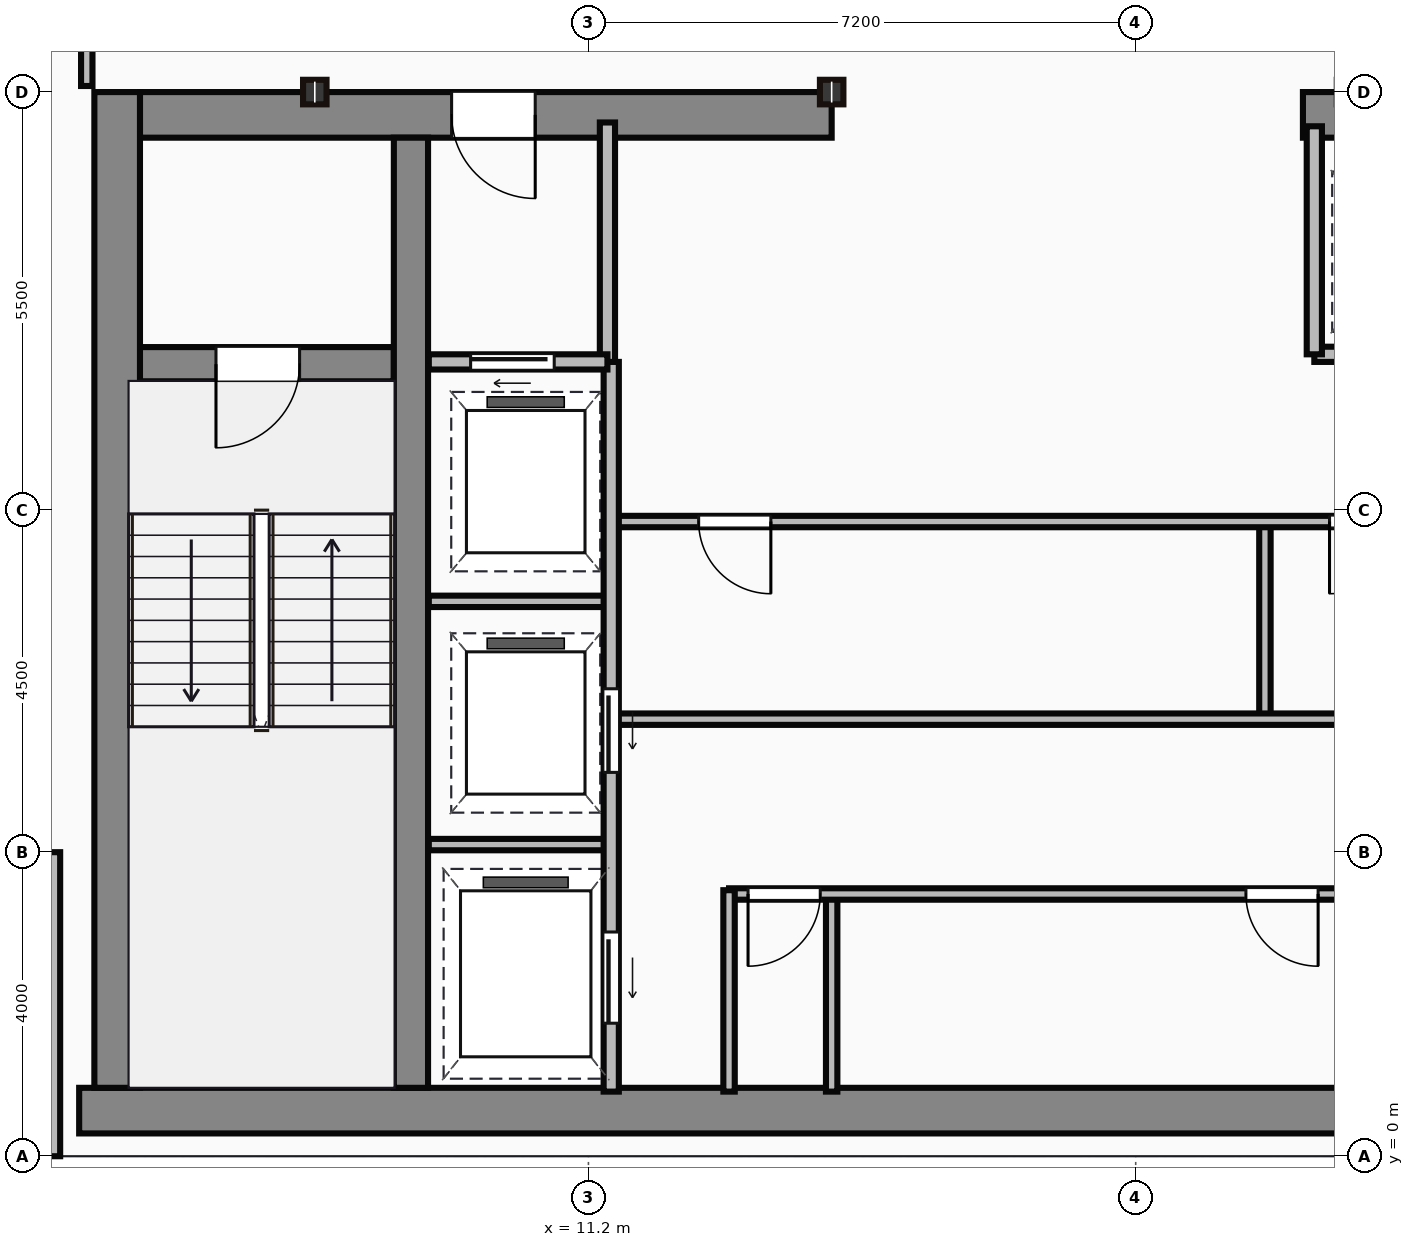
"""IFC4 building model, lengths in metres.
Left out: names, types, materials, properties, quantities, classifications, styles, units other than length and angle.
Written with IfcOpenShell. Run it as: python <this file> out.ifc"""

import sys

from ifc_helpers import new_model, si_unit, direction, frame, frame_2d, origin, origin_2d, place, context, subcontext, project, spatial, rectangle, i_section, extrude, source, transform, mapped, element, fill, save


model = new_model("IFC4")
c1 = context("Model", 3, precision=1e-05, world=origin(), true_north=direction((0.0, 1.0)))
c2 = subcontext(c1, "Body", "Model", "MODEL_VIEW")
j1 = project(units=[si_unit("LENGTHUNIT", "METRE"), si_unit("PLANEANGLEUNIT", "RADIAN")], contexts=[c1])
p1 = place(None, origin())
s1 = spatial("IfcSite", under=j1, at=p1, CompositionType="ELEMENT")
p2 = place(p1, origin())
s2 = spatial("IfcBuilding", under=s1, at=p2, CompositionType="ELEMENT")
p3 = place(p2, frame((0.0, 0.0, 225.1)))
s3 = spatial("IfcBuildingStorey", under=s2, at=p3, CompositionType="ELEMENT", Elevation=225.1)
m1 = source(origin(), c2, "Body", "SweptSolid", [
    extrude(rectangle(XDim=29.5, YDim=0.6, at=frame_2d((14.75, 0.0))), origin(), (0.0, 0.0, 1.0), 3.65),
])
p4 = place(p3, frame((4.5, 0.6, 0.0), z_axis=(0.0, 0.0, 1.0), x_axis=(1.0, 0.0, 0.0)))
e1 = element("IfcWall", 1, at=p4, inside=s3, PredefinedType="SHEAR", context=c2, shape_type="MappedRepresentation", body=[
    mapped(m1, transform((0.0, 0.0, 0.0))),
])
m2 = source(origin(), c2, "Body", "SweptSolid", [
    extrude(rectangle(XDim=13.1, YDim=0.6, at=frame_2d((6.55, 0.0))), origin(), (0.0, 0.0, 1.0), 3.65),
])
p5 = place(p3, frame((5.0, 0.9, 0.0), z_axis=(0.0, 0.0, 1.0), x_axis=(0.0, 1.0, 0.0)))
e2 = element("IfcWall", 2, at=p5, inside=s3, PredefinedType="SHEAR", context=c2, shape_type="MappedRepresentation", body=[
    mapped(m2, transform((0.0, 0.0, 0.0))),
])
m3 = source(origin(), c2, "Body", "SweptSolid", [
    extrude(rectangle(XDim=9.1, YDim=0.6, at=frame_2d((4.55, 0.0))), origin(), (0.0, 0.0, 1.0), 3.65),
])
p6 = place(p3, frame((5.3, 13.7, 0.0), z_axis=(0.0, 0.0, 1.0), x_axis=(1.0, 0.0, 0.0)))
e3 = element("IfcWall", 3, at=p6, inside=s3, PredefinedType="SHEAR", context=c2, shape_type="MappedRepresentation", body=[
    mapped(m3, transform((0.0, 0.0, 0.0))),
])
p7 = place(p6, frame((4.1, 0.0, 0.0)))
e4 = element("IfcOpeningElement", 4, at=p7, cuts=e3, PredefinedType="OPENING", context=c2, shape_type="SweptSolid", body=[
    extrude(rectangle(XDim=1.1, YDim=2.15, at=frame_2d((0.55, 1.075))), frame((0.0, 0.31, 0.0), z_axis=(0.0, -1.0, 0.0), x_axis=(1.0, 0.0, 0.0)), (0.0, 0.0, 1.0), 0.62),
])
m4 = source(origin(), c2, "Body", "SweptSolid", [
    extrude(rectangle(XDim=12.6, YDim=0.6, at=frame_2d((6.3, 0.0))), origin(), (0.0, 0.0, 1.0), 3.65),
])
p8 = place(p3, frame((20.6, 13.7, 0.0), z_axis=(0.0, 0.0, 1.0), x_axis=(1.0, 0.0, 0.0)))
e5 = element("IfcWall", 5, at=p8, inside=s3, PredefinedType="SHEAR", context=c2, shape_type="MappedRepresentation", body=[
    mapped(m4, transform((0.0, 0.0, 0.0))),
])
p9 = place(p8, frame((9.25, 0.0, 0.0)))
e6 = element("IfcOpeningElement", 6, at=p9, cuts=e5, PredefinedType="OPENING", context=c2, shape_type="SweptSolid", body=[
    extrude(rectangle(XDim=1.1, YDim=2.15, at=frame_2d((0.55, 1.075))), frame((0.0, 0.31, 0.0), z_axis=(0.0, -1.0, 0.0), x_axis=(1.0, 0.0, 0.0)), (0.0, 0.0, 1.0), 0.62),
])
m5 = source(origin(), c2, "Body", "SweptSolid", [
    extrude(rectangle(XDim=12.5, YDim=0.45, at=frame_2d((6.25, 0.0))), origin(), (0.0, 0.0, 1.0), 3.65),
])
p10 = place(p3, frame((8.865, 0.9, 0.0), z_axis=(0.0, 0.0, 1.0), x_axis=(0.0, 1.0, 0.0)))
e7 = element("IfcWall", 7, at=p10, inside=s3, PredefinedType="SHEAR", context=c2, shape_type="MappedRepresentation", body=[
    mapped(m5, transform((0.0, 0.0, 0.0))),
])
m6 = source(origin(), c2, "Body", "SweptSolid", [
    extrude(rectangle(XDim=3.39, YDim=0.45, at=frame_2d((1.695, 0.0))), origin(), (0.0, 0.0, 1.0), 3.65),
])
p11 = place(p3, frame((5.25, 10.42, 0.0), z_axis=(0.0, 0.0, 1.0), x_axis=(1.0, 0.0, 0.0)))
e8 = element("IfcWall", 8, at=p11, inside=s3, PredefinedType="SHEAR", context=c2, shape_type="MappedRepresentation", body=[
    mapped(m6, transform((0.0, 0.0, 0.0))),
])
p12 = place(p11, frame((1.05, 0.0, 0.0)))
e9 = element("IfcOpeningElement", 9, at=p12, cuts=e8, PredefinedType="OPENING", context=c2, shape_type="SweptSolid", body=[
    extrude(rectangle(XDim=1.1, YDim=2.15, at=frame_2d((0.55, 1.075))), frame((0.0, 0.235, 0.0), z_axis=(0.0, -1.0, 0.0), x_axis=(1.0, 0.0, 0.0)), (0.0, 0.0, 1.0), 0.47),
])
m7 = source(origin(), c2, "Body", "SweptSolid", [
    extrude(i_section(OverallWidth=0.309, OverallDepth=0.323, WebThickness=0.014, FlangeThickness=0.023, at=origin_2d()), origin(), (0.0, 0.0, 1.0), 3.65),
])
for number, where, z_axis, x_axis in (
    (10, (7.6, 14.0, 0.0), (0.0, 0.0, 1.0), (1.0, 0.0, 0.0)),
    (11, (14.4, 14.0, 0.0), (0.0, 0.0, 1.0), (1.0, 0.0, 0.0)),
):
    element("IfcColumn", number, at=place(p3, frame(where, z_axis=z_axis, x_axis=x_axis)), inside=s3, PredefinedType="COLUMN", context=c2, shape_type="MappedRepresentation", body=[
        mapped(m7, transform((0.0, 0.0, 0.0))),
    ])
m8 = source(origin(), c2, "Body", "SweptSolid", [
    extrude(rectangle(XDim=4.0, YDim=0.25, at=frame_2d((2.0, 0.0))), origin(), (0.0, 0.0, 1.0), 3.4),
])
p13 = place(p3, frame((4.125, 4.0, 0.0), z_axis=(0.0, 0.0, 1.0), x_axis=(0.0, -1.0, 0.0)))
e12 = element("IfcWall", 12, at=p13, inside=s3, PredefinedType="STANDARD", context=c2, shape_type="MappedRepresentation", body=[
    mapped(m8, transform((0.0, 0.0, 0.0))),
])
m9 = source(origin(), c2, "Body", "SweptSolid", [
    extrude(rectangle(XDim=3.18, YDim=0.2, at=frame_2d((1.59, 0.0))), origin(), (0.0, 0.0, 1.0), 3.4),
])
p14 = place(p3, frame((11.45, 10.42, 0.0), z_axis=(0.0, 0.0, 1.0), x_axis=(0.0, 1.0, 0.0)))
e13 = element("IfcWall", 13, at=p14, inside=s3, PredefinedType="PARTITIONING", context=c2, shape_type="MappedRepresentation", body=[
    mapped(m9, transform((0.0, 0.0, 0.0))),
])
m10 = source(origin(), c2, "Body", "SweptSolid", [
    extrude(rectangle(XDim=2.35, YDim=0.2, at=frame_2d((1.175, 0.0))), origin(), (0.0, 0.0, 1.0), 3.4),
])
p15 = place(p3, frame((9.1, 10.45, 0.0), z_axis=(0.0, 0.0, 1.0), x_axis=(1.0, 0.0, 0.0)))
e14 = element("IfcWall", 14, at=p15, inside=s3, PredefinedType="PARTITIONING", context=c2, shape_type="MappedRepresentation", body=[
    mapped(m10, transform((0.0, 0.0, 0.0))),
])
p16 = place(p15, frame((0.55, 0.0, 0.0)))
e15 = element("IfcOpeningElement", 15, at=p16, cuts=e14, PredefinedType="OPENING", context=c2, shape_type="SweptSolid", body=[
    extrude(rectangle(XDim=1.1, YDim=2.15, at=frame_2d((0.55, 1.075))), frame((0.0, 0.11, 0.0), z_axis=(0.0, -1.0, 0.0), x_axis=(1.0, 0.0, 0.0)), (0.0, 0.0, 1.0), 0.22),
])
m11 = source(origin(), c2, "Body", "SweptSolid", [
    extrude(rectangle(XDim=9.6, YDim=0.2, at=frame_2d((4.8, 0.0))), origin(), (0.0, 0.0, 1.0), 3.4),
])
p17 = place(p3, frame((11.5, 0.85, 0.0), z_axis=(0.0, 0.0, 1.0), x_axis=(0.0, 1.0, 0.0)))
e16 = element("IfcWall", 16, at=p17, inside=s3, PredefinedType="PARTITIONING", context=c2, shape_type="MappedRepresentation", body=[
    mapped(m11, transform((0.0, 0.0, 0.0))),
])
p18 = place(p17, frame((4.2, 0.0, 0.0)))
e17 = element("IfcOpeningElement", 17, at=p18, cuts=e16, PredefinedType="OPENING", context=c2, shape_type="SweptSolid", body=[
    extrude(rectangle(XDim=1.1, YDim=2.15, at=frame_2d((0.55, 1.075))), frame((0.0, 0.11, 0.0), z_axis=(0.0, -1.0, 0.0), x_axis=(1.0, 0.0, 0.0)), (0.0, 0.0, 1.0), 0.22),
])
p19 = place(p17, frame((0.9, 0.0, 0.0)))
e18 = element("IfcOpeningElement", 18, at=p19, cuts=e16, PredefinedType="OPENING", context=c2, shape_type="SweptSolid", body=[
    extrude(rectangle(XDim=1.2, YDim=2.15, at=frame_2d((0.6, 1.075))), frame((0.0, 0.11, 0.0), z_axis=(0.0, -1.0, 0.0), x_axis=(1.0, 0.0, 0.0)), (0.0, 0.0, 1.0), 0.22),
])
m12 = source(origin(), c2, "Body", "SweptSolid", [
    extrude(rectangle(XDim=2.4, YDim=0.15, at=frame_2d((1.2, 0.0))), origin(), (0.0, 0.0, 1.0), 3.4),
])
for number, where, z_axis, x_axis in (
    (19, (9.1, 4.1, 0.0), (0.0, 0.0, 1.0), (1.0, 0.0, 0.0)),
    (20, (9.1, 7.3, 0.0), (0.0, 0.0, 1.0), (1.0, 0.0, 0.0)),
):
    element("IfcWall", number, at=place(p3, frame(where, z_axis=z_axis, x_axis=x_axis)), inside=s3, PredefinedType="PARTITIONING", context=c2, shape_type="MappedRepresentation", body=[
        mapped(m12, transform((0.0, 0.0, 0.0))),
    ])
m13 = source(origin(), c2, "Body", "SweptSolid", [
    extrude(rectangle(XDim=2.65, YDim=0.15, at=frame_2d((1.325, 0.0))), origin(), (0.0, 0.0, 1.0), 3.4),
])
p20 = place(p3, frame((13.05, 0.85, 0.0), z_axis=(0.0, 0.0, 1.0), x_axis=(0.0, 1.0, 0.0)))
e21 = element("IfcWall", 21, at=p20, inside=s3, PredefinedType="PARTITIONING", context=c2, shape_type="MappedRepresentation", body=[
    mapped(m13, transform((0.0, 0.0, 0.0))),
])
m14 = source(origin(), c2, "Body", "SweptSolid", [
    extrude(rectangle(XDim=10.35, YDim=0.15, at=frame_2d((5.175, 0.0))), origin(), (0.0, 0.0, 1.0), 3.4),
])
p21 = place(p3, frame((13.05, 3.45, 0.0), z_axis=(0.0, 0.0, 1.0), x_axis=(1.0, 0.0, 0.0)))
e22 = element("IfcWall", 22, at=p21, inside=s3, PredefinedType="PARTITIONING", context=c2, shape_type="MappedRepresentation", body=[
    mapped(m14, transform((0.0, 0.0, 0.0))),
])
p22 = place(p21, frame((0.25, 0.0, 0.0)))
e23 = element("IfcOpeningElement", 23, at=p22, cuts=e22, PredefinedType="OPENING", context=c2, shape_type="SweptSolid", body=[
    extrude(rectangle(XDim=0.95, YDim=2.15, at=frame_2d((0.475, 1.075))), frame((0.0, 0.085, 0.0), z_axis=(0.0, -1.0, 0.0), x_axis=(1.0, 0.0, 0.0)), (0.0, 0.0, 1.0), 0.17),
])
p23 = place(p21, frame((6.8, 0.0, 0.0)))
e24 = element("IfcOpeningElement", 24, at=p23, cuts=e22, PredefinedType="OPENING", context=c2, shape_type="SweptSolid", body=[
    extrude(rectangle(XDim=0.95, YDim=2.15, at=frame_2d((0.475, 1.075))), frame((0.0, 0.085, 0.0), z_axis=(0.0, -1.0, 0.0), x_axis=(1.0, 0.0, 0.0)), (0.0, 0.0, 1.0), 0.17),
])
m15 = source(origin(), c2, "Body", "SweptSolid", [
    extrude(rectangle(XDim=2.6, YDim=0.15, at=frame_2d((1.3, 0.0))), origin(), (0.0, 0.0, 1.0), 3.4),
])
p24 = place(p3, frame((14.4, 0.85, 0.0), z_axis=(0.0, 0.0, 1.0), x_axis=(0.0, 1.0, 0.0)))
e25 = element("IfcWall", 25, at=p24, inside=s3, PredefinedType="PARTITIONING", context=c2, shape_type="MappedRepresentation", body=[
    mapped(m15, transform((0.0, 0.0, 0.0))),
])
m16 = source(origin(), c2, "Body", "SweptSolid", [
    extrude(rectangle(XDim=11.85, YDim=0.15, at=frame_2d((5.925, 0.0))), origin(), (0.0, 0.0, 1.0), 3.4),
])
p25 = place(p3, frame((11.55, 5.75, 0.0), z_axis=(0.0, 0.0, 1.0), x_axis=(1.0, 0.0, 0.0)))
e26 = element("IfcWall", 26, at=p25, inside=s3, PredefinedType="PARTITIONING", context=c2, shape_type="MappedRepresentation", body=[
    mapped(m16, transform((0.0, 0.0, 0.0))),
])
p26 = place(p3, frame((11.55, 8.35, 0.0), z_axis=(0.0, 0.0, 1.0), x_axis=(1.0, 0.0, 0.0)))
e27 = element("IfcWall", 27, at=p26, inside=s3, PredefinedType="PARTITIONING", context=c2, shape_type="MappedRepresentation", body=[
    mapped(m16, transform((0.0, 0.0, 0.0))),
])
p27 = place(p26, frame((1.1, 0.0, 0.0)))
e28 = element("IfcOpeningElement", 28, at=p27, cuts=e27, PredefinedType="OPENING", context=c2, shape_type="SweptSolid", body=[
    extrude(rectangle(XDim=0.95, YDim=2.15, at=frame_2d((0.475, 1.075))), frame((0.0, 0.085, 0.0), z_axis=(0.0, -1.0, 0.0), x_axis=(1.0, 0.0, 0.0)), (0.0, 0.0, 1.0), 0.17),
])
p28 = place(p26, frame((9.4, 0.0, 0.0)))
e29 = element("IfcOpeningElement", 29, at=p28, cuts=e27, PredefinedType="OPENING", context=c2, shape_type="SweptSolid", body=[
    extrude(rectangle(XDim=0.95, YDim=2.15, at=frame_2d((0.475, 1.075))), frame((0.0, 0.085, 0.0), z_axis=(0.0, -1.0, 0.0), x_axis=(1.0, 0.0, 0.0)), (0.0, 0.0, 1.0), 0.17),
])
m17 = source(origin(), c2, "Body", "SweptSolid", [
    extrude(rectangle(XDim=2.5, YDim=0.15, at=frame_2d((1.25, 0.0))), origin(), (0.0, 0.0, 1.0), 3.4),
])
p29 = place(p3, frame((20.1, 5.8, 0.0), z_axis=(0.0, 0.0, 1.0), x_axis=(0.0, 1.0, 0.0)))
e30 = element("IfcWall", 30, at=p29, inside=s3, PredefinedType="PARTITIONING", context=c2, shape_type="MappedRepresentation", body=[
    mapped(m17, transform((0.0, 0.0, 0.0))),
])
m18 = source(origin(), c2, "Body", "SweptSolid", [
    extrude(rectangle(XDim=8.8, YDim=0.2, at=frame_2d((4.4, 0.0))), origin(), (0.0, 0.0, 1.0), 3.4),
])
p30 = place(p3, frame((20.75, 10.55, 0.0), z_axis=(0.0, 0.0, 1.0), x_axis=(1.0, 0.0, 0.0)))
e31 = element("IfcWall", 31, at=p30, inside=s3, PredefinedType="PARTITIONING", context=c2, shape_type="MappedRepresentation", body=[
    mapped(m18, transform((0.0, 0.0, 0.0))),
])
p31 = place(p30, frame((0.5, 0.0, 0.0)))
e32 = element("IfcOpeningElement", 32, at=p31, cuts=e31, PredefinedType="OPENING", context=c2, shape_type="SweptSolid", body=[
    extrude(rectangle(XDim=1.05, YDim=2.15, at=frame_2d((0.525, 1.075))), frame((0.0, 0.11, 0.0), z_axis=(0.0, -1.0, 0.0), x_axis=(1.0, 0.0, 0.0)), (0.0, 0.0, 1.0), 0.22),
])
p32 = place(p30, frame((2.6, 0.0, 0.0)))
e33 = element("IfcOpeningElement", 33, at=p32, cuts=e31, PredefinedType="OPENING", context=c2, shape_type="SweptSolid", body=[
    extrude(rectangle(XDim=1.05, YDim=2.15, at=frame_2d((0.525, 1.075))), frame((0.0, 0.11, 0.0), z_axis=(0.0, -1.0, 0.0), x_axis=(1.0, 0.0, 0.0)), (0.0, 0.0, 1.0), 0.22),
])
p33 = place(p30, frame((4.7, 0.0, 0.0)))
e34 = element("IfcOpeningElement", 34, at=p33, cuts=e31, PredefinedType="OPENING", context=c2, shape_type="SweptSolid", body=[
    extrude(rectangle(XDim=1.05, YDim=2.15, at=frame_2d((0.525, 1.075))), frame((0.0, 0.11, 0.0), z_axis=(0.0, -1.0, 0.0), x_axis=(1.0, 0.0, 0.0)), (0.0, 0.0, 1.0), 0.22),
])
p34 = place(p30, frame((6.8, 0.0, 0.0)))
e35 = element("IfcOpeningElement", 35, at=p34, cuts=e31, PredefinedType="OPENING", context=c2, shape_type="SweptSolid", body=[
    extrude(rectangle(XDim=1.05, YDim=2.15, at=frame_2d((0.525, 1.075))), frame((0.0, 0.11, 0.0), z_axis=(0.0, -1.0, 0.0), x_axis=(1.0, 0.0, 0.0)), (0.0, 0.0, 1.0), 0.22),
])
m19 = source(origin(), c2, "Body", "SweptSolid", [
    extrude(rectangle(XDim=3.0, YDim=0.2, at=frame_2d((1.5, 0.0))), origin(), (0.0, 0.0, 1.0), 3.4),
])
p35 = place(p3, frame((20.75, 10.55, 0.0), z_axis=(0.0, 0.0, 1.0), x_axis=(0.0, 1.0, 0.0)))
e36 = element("IfcWall", 36, at=p35, inside=s3, PredefinedType="PARTITIONING", context=c2, shape_type="MappedRepresentation", body=[
    mapped(m19, transform((0.0, 0.0, 0.0))),
])
m20 = source(origin(), c2, "Body", "SweptSolid", [
    extrude(rectangle(XDim=2.12, YDim=0.15, at=frame_2d((1.06, 0.0))), origin(), (0.0, 0.0, 1.0), 3.4),
])
p36 = place(p3, frame((4.6, 14.08, 0.0), z_axis=(0.0, 0.0, 1.0), x_axis=(0.0, 1.0, 0.0)))
e37 = element("IfcWall", 37, at=p36, inside=s3, PredefinedType="PARTITIONING", context=c2, shape_type="MappedRepresentation", body=[
    mapped(m20, transform((0.0, 0.0, 0.0))),
])
m21 = source(origin(), c2, "Body", "SweptSolid", [
    extrude(rectangle(XDim=1.1, YDim=2.15, at=frame_2d((0.55, 1.075))), frame((0.0, 0.025, 0.0), z_axis=(0.0, -1.0, 0.0), x_axis=(1.0, 0.0, 0.0)), (0.0, 0.0, 1.0), 0.05),
])
p37 = place(p12, frame((1.1, 0.0, 0.0), z_axis=(0.0, 0.0, 1.0), x_axis=(-1.0, 0.0, 0.0)))
e38 = element("IfcDoor", 38, at=p37, inside=s3, OperationType="SINGLE_SWING_LEFT", PredefinedType="DOOR", context=c2, shape_type="MappedRepresentation", body=[
    mapped(m21, transform((0.0, 0.0, 0.0))),
])
fill(e9, e38)
p38 = place(p7, origin())
e39 = element("IfcDoor", 39, at=p38, inside=s3, OperationType="SINGLE_SWING_RIGHT", PredefinedType="DOOR", context=c2, shape_type="MappedRepresentation", body=[
    mapped(m21, transform((0.0, 0.0, 0.0))),
])
fill(e4, e39)
p39 = place(p16, origin())
e40 = element("IfcDoor", 40, at=p39, inside=s3, OperationType="SLIDING_TO_LEFT", PredefinedType="DOOR", context=c2, shape_type="MappedRepresentation", body=[
    mapped(m21, transform((0.0, 0.0, 0.0))),
])
fill(e15, e40)
p40 = place(p18, frame((1.1, 0.0, 0.0), z_axis=(0.0, 0.0, 1.0), x_axis=(-1.0, 0.0, 0.0)))
e41 = element("IfcDoor", 41, at=p40, inside=s3, OperationType="SLIDING_TO_LEFT", PredefinedType="DOOR", context=c2, shape_type="MappedRepresentation", body=[
    mapped(m21, transform((0.0, 0.0, 0.0))),
])
fill(e17, e41)
m22 = source(origin(), c2, "Body", "SweptSolid", [
    extrude(rectangle(XDim=1.2, YDim=2.15, at=frame_2d((0.6, 1.075))), frame((0.0, 0.025, 0.0), z_axis=(0.0, -1.0, 0.0), x_axis=(1.0, 0.0, 0.0)), (0.0, 0.0, 1.0), 0.05),
])
p41 = place(p19, frame((1.2, 0.0, 0.0), z_axis=(0.0, 0.0, 1.0), x_axis=(-1.0, 0.0, 0.0)))
e42 = element("IfcDoor", 42, at=p41, inside=s3, OperationType="SLIDING_TO_LEFT", PredefinedType="DOOR", context=c2, shape_type="MappedRepresentation", body=[
    mapped(m22, transform((0.0, 0.0, 0.0))),
])
fill(e18, e42)
m23 = source(origin(), c2, "Body", "SweptSolid", [
    extrude(rectangle(XDim=0.95, YDim=2.15, at=frame_2d((0.475, 1.075))), frame((0.0, 0.025, 0.0), z_axis=(0.0, -1.0, 0.0), x_axis=(1.0, 0.0, 0.0)), (0.0, 0.0, 1.0), 0.05),
])
p42 = place(p22, origin())
e43 = element("IfcDoor", 43, at=p42, inside=s3, OperationType="SINGLE_SWING_LEFT", PredefinedType="DOOR", context=c2, shape_type="MappedRepresentation", body=[
    mapped(m23, transform((0.0, 0.0, 0.0))),
])
fill(e23, e43)
p43 = place(p23, origin())
e44 = element("IfcDoor", 44, at=p43, inside=s3, OperationType="SINGLE_SWING_RIGHT", PredefinedType="DOOR", context=c2, shape_type="MappedRepresentation", body=[
    mapped(m23, transform((0.0, 0.0, 0.0))),
])
fill(e24, e44)
p44 = place(p27, origin())
e45 = element("IfcDoor", 45, at=p44, inside=s3, OperationType="SINGLE_SWING_RIGHT", PredefinedType="DOOR", context=c2, shape_type="MappedRepresentation", body=[
    mapped(m23, transform((0.0, 0.0, 0.0))),
])
fill(e28, e45)
p45 = place(p28, origin())
e46 = element("IfcDoor", 46, at=p45, inside=s3, OperationType="SINGLE_SWING_LEFT", PredefinedType="DOOR", context=c2, shape_type="MappedRepresentation", body=[
    mapped(m23, transform((0.0, 0.0, 0.0))),
])
fill(e29, e46)
save(model, sys.argv[1])
